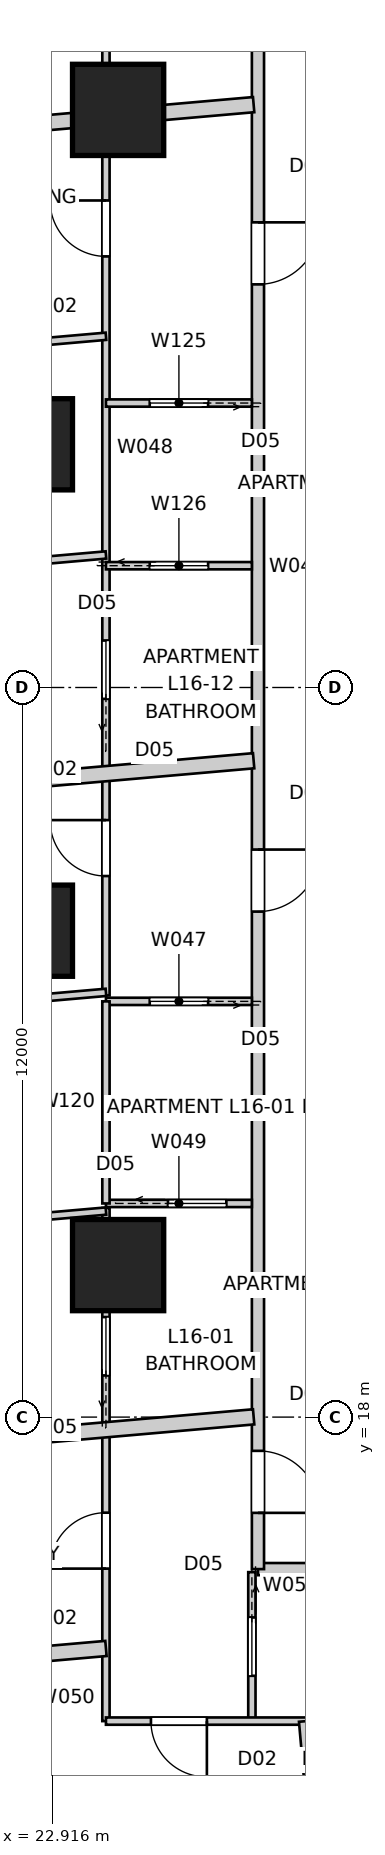
"""IFC4 building model, lengths in metres.
Left out: names, types, materials, properties, quantities, classifications, styles, units other than length and angle.
Written with IfcOpenShell. Run it as: python <this file> out.ifc"""

import sys

from ifc_helpers import new_model, si_unit, direction, frame, frame_2d, origin, origin_2d, place, context, subcontext, project, spatial, rectangle, extrude, element, fill, save


model = new_model("IFC4")
c1 = context("Model", 3, precision=1e-05, world=origin(), true_north=direction((0.0, 1.0)))
c2 = subcontext(c1, "Body", "Model", "MODEL_VIEW")
j1 = project(units=[si_unit("LENGTHUNIT", "METRE"), si_unit("PLANEANGLEUNIT", "RADIAN")], contexts=[c1])
p1 = place(None, origin())
s1 = spatial("IfcSite", under=j1, at=p1, CompositionType="ELEMENT")
p2 = place(p1, origin())
s2 = spatial("IfcBuilding", under=s1, at=p2, CompositionType="ELEMENT")
p3 = place(p2, frame((0.0, 0.0, 60.8)))
s3 = spatial("IfcBuildingStorey", under=s2, at=p3, CompositionType="ELEMENT", Elevation=60.8)
for number, where, z_axis, x_axis in (
    (1, (24.0, 39.5, 0.0), (0.0, 0.0, 1.0), (1.0, 0.0, 0.0)),
    (2, (22.5, 34.0, 0.0), (0.0, 0.0, 1.0), (1.0, 0.0, 0.0)),
    (3, (22.5, 26.0, 0.0), (0.0, 0.0, 1.0), (1.0, 0.0, 0.0)),
    (4, (24.0, 20.5, 0.0), (0.0, 0.0, 1.0), (1.0, 0.0, 0.0)),
):
    element("IfcColumn", number, at=place(p3, frame(where, z_axis=z_axis, x_axis=x_axis)), inside=s3, PredefinedType="COLUMN", context=c2, shape_type="SweptSolid", body=[
        extrude(rectangle(XDim=1.5, YDim=1.5, at=origin_2d()), origin(), (0.0, 0.0, 1.0), 3.4),
    ])
p4 = place(p3, frame((26.3, 15.5, 0.0), z_axis=(0.0, 0.0, 1.0), x_axis=(1.0, 0.0, 0.0)))
e5 = element("IfcWall", 5, at=p4, inside=s3, PredefinedType="PARTITIONING", context=c2, shape_type="SweptSolid", body=[
    extrude(rectangle(XDim=27.4, YDim=0.2, at=frame_2d((13.7, 0.0))), origin(), (0.0, 0.0, 1.0), 3.25),
])
p5 = place(p4, frame((18.776, 0.0, 0.0)))
e6 = element("IfcOpeningElement", 6, at=p5, cuts=e5, PredefinedType="OPENING", context=c2, shape_type="SweptSolid", body=[
    extrude(rectangle(XDim=1.02, YDim=2.34, at=frame_2d((0.51, 1.17))), frame((0.0, 0.11, 0.0), z_axis=(0.0, -1.0, 0.0), x_axis=(1.0, 0.0, 0.0)), (0.0, 0.0, 1.0), 0.22),
])
p6 = place(p4, frame((5.793, 0.0, 0.0)))
e7 = element("IfcOpeningElement", 7, at=p6, cuts=e5, PredefinedType="OPENING", context=c2, shape_type="SweptSolid", body=[
    extrude(rectangle(XDim=1.02, YDim=2.34, at=frame_2d((0.51, 1.17))), frame((0.0, 0.11, 0.0), z_axis=(0.0, -1.0, 0.0), x_axis=(1.0, 0.0, 0.0)), (0.0, 0.0, 1.0), 0.22),
])
p7 = place(p3, frame((26.3, 44.5, 0.0), z_axis=(0.0, 0.0, 1.0), x_axis=(0.0, -1.0, 0.0)))
e8 = element("IfcWall", 8, at=p7, inside=s3, PredefinedType="PARTITIONING", context=c2, shape_type="SweptSolid", body=[
    extrude(rectangle(XDim=29.0, YDim=0.2, at=frame_2d((14.5, 0.0))), origin(), (0.0, 0.0, 1.0), 3.25),
])
p8 = place(p7, frame((6.85, 0.0, 0.0)))
e9 = element("IfcOpeningElement", 9, at=p8, cuts=e8, PredefinedType="OPENING", context=c2, shape_type="SweptSolid", body=[
    extrude(rectangle(XDim=1.02, YDim=2.34, at=frame_2d((0.51, 1.17))), frame((0.0, 0.11, 0.0), z_axis=(0.0, -1.0, 0.0), x_axis=(1.0, 0.0, 0.0)), (0.0, 0.0, 1.0), 0.22),
])
p9 = place(p7, frame((2.345, 0.0, 0.0)))
e10 = element("IfcOpeningElement", 10, at=p9, cuts=e8, PredefinedType="OPENING", context=c2, shape_type="SweptSolid", body=[
    extrude(rectangle(XDim=1.02, YDim=2.1, at=frame_2d((0.51, 1.05))), frame((0.0, 0.11, 0.0), z_axis=(0.0, -1.0, 0.0), x_axis=(1.0, 0.0, 0.0)), (0.0, 0.0, 1.0), 0.22),
])
p10 = place(p7, frame((17.166, 0.0, 0.0)))
e11 = element("IfcOpeningElement", 11, at=p10, cuts=e8, PredefinedType="OPENING", context=c2, shape_type="SweptSolid", body=[
    extrude(rectangle(XDim=1.02, YDim=2.34, at=frame_2d((0.51, 1.17))), frame((0.0, 0.11, 0.0), z_axis=(0.0, -1.0, 0.0), x_axis=(1.0, 0.0, 0.0)), (0.0, 0.0, 1.0), 0.22),
])
p11 = place(p7, frame((27.055, 0.0, 0.0)))
e12 = element("IfcOpeningElement", 12, at=p11, cuts=e8, PredefinedType="OPENING", context=c2, shape_type="SweptSolid", body=[
    extrude(rectangle(XDim=1.02, YDim=2.34, at=frame_2d((0.51, 1.17))), frame((0.0, 0.11, 0.0), z_axis=(0.0, -1.0, 0.0), x_axis=(1.0, 0.0, 0.0)), (0.0, 0.0, 1.0), 0.22),
])
p12 = place(p3, frame((13.66, 38.487, 0.0), z_axis=(0.0, 0.0, 1.0), x_axis=(0.996194851608, 0.087153988028, 0.0)))
e13 = element("IfcWall", 13, at=p12, inside=s3, PredefinedType="PARTITIONING", context=c2, shape_type="SweptSolid", body=[
    extrude(rectangle(XDim=12.617, YDim=0.25, at=frame_2d((6.309, 0.0))), origin(), (0.0, 0.0, 1.0), 3.25),
])
p13 = place(p3, frame((15.534, 17.068, 0.0), z_axis=(0.0, 0.0, 1.0), x_axis=(0.996193939644, 0.08716441141, 0.0)))
e14 = element("IfcWall", 14, at=p13, inside=s3, PredefinedType="PARTITIONING", context=c2, shape_type="SweptSolid", body=[
    extrude(rectangle(XDim=10.736, YDim=0.25, at=frame_2d((5.368, 0.0))), origin(), (0.0, 0.0, 1.0), 3.25),
])
p14 = place(p3, frame((14.597, 27.778, 0.0), z_axis=(0.0, 0.0, 1.0), x_axis=(0.996195419442, 0.087147497287, 0.0)))
e15 = element("IfcWall", 15, at=p14, inside=s3, PredefinedType="PARTITIONING", context=c2, shape_type="SweptSolid", body=[
    extrude(rectangle(XDim=11.677, YDim=0.25, at=frame_2d((5.838, 0.0))), origin(), (0.0, 0.0, 1.0), 3.25),
])
p15 = place(p3, frame((26.2, 24.838, 0.0), z_axis=(0.0, 0.0, 1.0), x_axis=(-1.0, 0.0, 0.0)))
e16 = element("IfcWall", 16, at=p15, inside=s3, PredefinedType="PARTITIONING", context=c2, shape_type="SweptSolid", body=[
    extrude(rectangle(XDim=2.4, YDim=0.12, at=frame_2d((1.2, 0.0))), origin(), (0.0, 0.0, 1.0), 3.25),
])
p16 = place(p15, frame((0.72, 0.0, 0.0)))
e17 = element("IfcOpeningElement", 17, at=p16, cuts=e16, PredefinedType="OPENING", context=c2, shape_type="SweptSolid", body=[
    extrude(rectangle(XDim=0.96, YDim=2.1, at=frame_2d((0.48, 1.05))), frame((0.0, 0.07, 0.0), z_axis=(0.0, -1.0, 0.0), x_axis=(1.0, 0.0, 0.0)), (0.0, 0.0, 1.0), 0.14),
])
p17 = place(p3, frame((23.8, 24.936, 0.0), z_axis=(0.0, 0.0, 1.0), x_axis=(0.0, 1.0, 0.0)))
e18 = element("IfcWall", 18, at=p17, inside=s3, PredefinedType="PARTITIONING", context=c2, shape_type="SweptSolid", body=[
    extrude(rectangle(XDim=22.064, YDim=0.12, at=frame_2d((11.032, 0.0))), origin(), (0.0, 0.0, 1.0), 2.55),
])
p18 = place(p17, frame((12.155, 0.0, 0.0)))
e19 = element("IfcOpeningElement", 19, at=p18, cuts=e18, PredefinedType="OPENING", context=c2, shape_type="SweptSolid", body=[
    extrude(rectangle(XDim=0.92, YDim=2.34, at=frame_2d((0.46, 1.17))), frame((0.0, 0.07, 0.0), z_axis=(0.0, -1.0, 0.0), x_axis=(1.0, 0.0, 0.0)), (0.0, 0.0, 1.0), 0.14),
])
p19 = place(p17, frame((16.136, 0.0, 0.0)))
e20 = element("IfcOpeningElement", 20, at=p19, cuts=e18, PredefinedType="OPENING", context=c2, shape_type="SweptSolid", body=[
    extrude(rectangle(XDim=0.92, YDim=2.34, at=frame_2d((0.46, 1.17))), frame((0.0, 0.07, 0.0), z_axis=(0.0, -1.0, 0.0), x_axis=(1.0, 0.0, 0.0)), (0.0, 0.0, 1.0), 0.14),
])
p20 = place(p17, frame((1.964, 0.0, 0.0)))
e21 = element("IfcOpeningElement", 21, at=p20, cuts=e18, PredefinedType="OPENING", context=c2, shape_type="SweptSolid", body=[
    extrude(rectangle(XDim=0.92, YDim=2.34, at=frame_2d((0.46, 1.17))), frame((0.0, 0.07, 0.0), z_axis=(0.0, -1.0, 0.0), x_axis=(1.0, 0.0, 0.0)), (0.0, 0.0, 1.0), 0.14),
])
p21 = place(p17, frame((4.877, 0.0, 0.0)))
e22 = element("IfcOpeningElement", 22, at=p21, cuts=e18, PredefinedType="OPENING", context=c2, shape_type="SweptSolid", body=[
    extrude(rectangle(XDim=0.96, YDim=2.1, at=frame_2d((0.48, 1.05))), frame((0.0, 0.07, 0.0), z_axis=(0.0, -1.0, 0.0), x_axis=(1.0, 0.0, 0.0)), (0.0, 0.0, 1.0), 0.14),
])
p22 = place(p3, frame((23.8, 21.514, 0.0), z_axis=(0.0, 0.0, 1.0), x_axis=(1.0, 0.0, 0.0)))
e23 = element("IfcWall", 23, at=p22, inside=s3, PredefinedType="PARTITIONING", context=c2, shape_type="SweptSolid", body=[
    extrude(rectangle(XDim=2.4, YDim=0.12, at=frame_2d((1.2, 0.0))), origin(), (0.0, 0.0, 1.0), 3.25),
])
p23 = place(p22, frame((1.02, 0.0, 0.0)))
e24 = element("IfcOpeningElement", 24, at=p23, cuts=e23, PredefinedType="OPENING", context=c2, shape_type="SweptSolid", body=[
    extrude(rectangle(XDim=0.96, YDim=2.1, at=frame_2d((0.48, 1.05))), frame((0.0, 0.07, 0.0), z_axis=(0.0, -1.0, 0.0), x_axis=(1.0, 0.0, 0.0)), (0.0, 0.0, 1.0), 0.14),
])
p24 = place(p3, frame((23.8, 13.0, 0.0), z_axis=(0.0, 0.0, 1.0), x_axis=(0.0, 1.0, 0.0)))
e25 = element("IfcWall", 25, at=p24, inside=s3, PredefinedType="PARTITIONING", context=c2, shape_type="SweptSolid", body=[
    extrude(rectangle(XDim=8.439, YDim=0.12, at=frame_2d((4.219, 0.0))), origin(), (0.0, 0.0, 1.0), 2.55),
])
p25 = place(p24, frame((2.508, 0.0, 0.0)))
e26 = element("IfcOpeningElement", 26, at=p25, cuts=e25, PredefinedType="OPENING", context=c2, shape_type="SweptSolid", body=[
    extrude(rectangle(XDim=0.92, YDim=2.34, at=frame_2d((0.46, 1.17))), frame((0.0, 0.07, 0.0), z_axis=(0.0, -1.0, 0.0), x_axis=(1.0, 0.0, 0.0)), (0.0, 0.0, 1.0), 0.14),
])
p26 = place(p24, frame((5.685, 0.0, 0.0)))
e27 = element("IfcOpeningElement", 27, at=p26, cuts=e25, PredefinedType="OPENING", context=c2, shape_type="SweptSolid", body=[
    extrude(rectangle(XDim=0.96, YDim=2.1, at=frame_2d((0.48, 1.05))), frame((0.0, 0.07, 0.0), z_axis=(0.0, -1.0, 0.0), x_axis=(1.0, 0.0, 0.0)), (0.0, 0.0, 1.0), 0.14),
])
p27 = place(p3, frame((23.8, 21.514, 0.0), z_axis=(0.0, 0.0, 1.0), x_axis=(0.0, 1.0, 0.0)))
e28 = element("IfcWall", 28, at=p27, inside=s3, PredefinedType="PARTITIONING", context=c2, shape_type="SweptSolid", body=[
    extrude(rectangle(XDim=3.324, YDim=0.12, at=frame_2d((1.662, 0.0))), origin(), (0.0, 0.0, 1.0), 3.25),
])
p28 = place(p3, frame((23.8, 24.986, 0.0), z_axis=(0.0, 0.0, 1.0), x_axis=(-0.996194045583, -0.087163200634, 0.0)))
e29 = element("IfcWall", 29, at=p28, inside=s3, PredefinedType="PARTITIONING", context=c2, shape_type="SweptSolid", body=[
    extrude(rectangle(XDim=8.885, YDim=0.12, at=frame_2d((4.442, 0.0))), origin(), (0.0, 0.0, 1.0), 3.25),
])
p29 = place(p28, frame((4.002, 0.0, 0.0)))
e30 = element("IfcOpeningElement", 30, at=p29, cuts=e29, PredefinedType="OPENING", context=c2, shape_type="SweptSolid", body=[
    extrude(rectangle(XDim=0.92, YDim=2.34, at=frame_2d((0.46, 1.17))), frame((0.0, 0.07, 0.0), z_axis=(0.0, -1.0, 0.0), x_axis=(1.0, 0.0, 0.0)), (0.0, 0.0, 1.0), 0.14),
])
p30 = place(p3, frame((23.8, 21.389, 0.0), z_axis=(0.0, 0.0, 1.0), x_axis=(-0.996194273991, -0.087160590107, 0.0)))
e31 = element("IfcWall", 31, at=p30, inside=s3, PredefinedType="PARTITIONING", context=c2, shape_type="SweptSolid", body=[
    extrude(rectangle(XDim=8.571, YDim=0.12, at=frame_2d((4.286, 0.0))), origin(), (0.0, 0.0, 1.0), 3.25),
])
p31 = place(p3, frame((26.2, 15.45, 0.0), z_axis=(0.0, 0.0, 1.0), x_axis=(0.0, -1.0, 0.0)))
e32 = element("IfcWall", 32, at=p31, inside=s3, PredefinedType="PARTITIONING", context=c2, shape_type="SweptSolid", body=[
    extrude(rectangle(XDim=2.45, YDim=0.12, at=frame_2d((1.225, 0.0))), origin(), (0.0, 0.0, 1.0), 3.25),
])
p32 = place(p31, frame((0.745, 0.0, 0.0)))
e33 = element("IfcOpeningElement", 33, at=p32, cuts=e32, PredefinedType="OPENING", context=c2, shape_type="SweptSolid", body=[
    extrude(rectangle(XDim=0.96, YDim=2.1, at=frame_2d((0.48, 1.05))), frame((0.0, 0.07, 0.0), z_axis=(0.0, -1.0, 0.0), x_axis=(1.0, 0.0, 0.0)), (0.0, 0.0, 1.0), 0.14),
])
p33 = place(p3, frame((30.333, 13.0, 0.0), z_axis=(0.0, 0.0, 1.0), x_axis=(-1.0, 0.0, 0.0)))
e34 = element("IfcWall", 34, at=p33, inside=s3, PredefinedType="PARTITIONING", context=c2, shape_type="SweptSolid", body=[
    extrude(rectangle(XDim=6.533, YDim=0.12, at=frame_2d((3.267, 0.0))), origin(), (0.0, 0.0, 1.0), 3.25),
])
p34 = place(p33, frame((4.873, 0.0, 0.0)))
e35 = element("IfcOpeningElement", 35, at=p34, cuts=e34, PredefinedType="OPENING", context=c2, shape_type="SweptSolid", body=[
    extrude(rectangle(XDim=0.92, YDim=2.34, at=frame_2d((0.46, 1.17))), frame((0.0, 0.07, 0.0), z_axis=(0.0, -1.0, 0.0), x_axis=(1.0, 0.0, 0.0)), (0.0, 0.0, 1.0), 0.14),
])
p35 = place(p33, frame((1.162, 0.0, 0.0)))
e36 = element("IfcOpeningElement", 36, at=p35, cuts=e34, PredefinedType="OPENING", context=c2, shape_type="SweptSolid", body=[
    extrude(rectangle(XDim=0.96, YDim=2.1, at=frame_2d((0.48, 1.05))), frame((0.0, 0.07, 0.0), z_axis=(0.0, -1.0, 0.0), x_axis=(1.0, 0.0, 0.0)), (0.0, 0.0, 1.0), 0.14),
])
p36 = place(p3, frame((16.843, 13.586, 0.0), z_axis=(0.0, 0.0, 1.0), x_axis=(0.996195462691, 0.087147002895, 0.0)))
e37 = element("IfcWall", 37, at=p36, inside=s3, PredefinedType="PARTITIONING", context=c2, shape_type="SweptSolid", body=[
    extrude(rectangle(XDim=6.984, YDim=0.25, at=frame_2d((3.492, 0.0))), origin(), (0.0, 0.0, 1.0), 2.638),
])
p37 = place(p36, frame((1.548, 0.0, 0.0)))
e38 = element("IfcOpeningElement", 38, at=p37, cuts=e37, PredefinedType="OPENING", context=c2, shape_type="SweptSolid", body=[
    extrude(rectangle(XDim=0.92, YDim=2.34, at=frame_2d((0.46, 1.17))), frame((0.0, 0.135, 0.0), z_axis=(0.0, -1.0, 0.0), x_axis=(1.0, 0.0, 0.0)), (0.0, 0.0, 1.0), 0.27),
])
p38 = place(p3, frame((27.099, 13.0, 0.0), z_axis=(0.0, 0.0, 1.0), x_axis=(0.087158236544, -0.99619447991, 0.0)))
e39 = element("IfcWall", 39, at=p38, inside=s3, PredefinedType="PARTITIONING", context=c2, shape_type="SweptSolid", body=[
    extrude(rectangle(XDim=8.689, YDim=0.25, at=frame_2d((4.344, 0.0))), origin(), (0.0, 0.0, 1.0), 2.638),
])
p39 = place(p3, frame((26.2, 34.678, 0.0), z_axis=(0.0, 0.0, 1.0), x_axis=(-1.0, 0.0, 0.0)))
e40 = element("IfcWall", 40, at=p39, inside=s3, PredefinedType="PARTITIONING", context=c2, shape_type="SweptSolid", body=[
    extrude(rectangle(XDim=2.4, YDim=0.12, at=frame_2d((1.2, 0.0))), origin(), (0.0, 0.0, 1.0), 3.25),
])
p40 = place(p39, frame((0.72, 0.0, 0.0)))
e41 = element("IfcOpeningElement", 41, at=p40, cuts=e40, PredefinedType="OPENING", context=c2, shape_type="SweptSolid", body=[
    extrude(rectangle(XDim=0.96, YDim=2.1, at=frame_2d((0.48, 1.05))), frame((0.0, 0.07, 0.0), z_axis=(0.0, -1.0, 0.0), x_axis=(1.0, 0.0, 0.0)), (0.0, 0.0, 1.0), 0.14),
])
p41 = place(p3, frame((23.8, 32.003, 0.0), z_axis=(0.0, 0.0, 1.0), x_axis=(1.0, 0.0, 0.0)))
e42 = element("IfcWall", 42, at=p41, inside=s3, PredefinedType="PARTITIONING", context=c2, shape_type="SweptSolid", body=[
    extrude(rectangle(XDim=2.4, YDim=0.12, at=frame_2d((1.2, 0.0))), origin(), (0.0, 0.0, 1.0), 3.25),
])
p42 = place(p41, frame((0.72, 0.0, 0.0)))
e43 = element("IfcOpeningElement", 43, at=p42, cuts=e42, PredefinedType="OPENING", context=c2, shape_type="SweptSolid", body=[
    extrude(rectangle(XDim=0.96, YDim=2.1, at=frame_2d((0.48, 1.05))), frame((0.0, 0.07, 0.0), z_axis=(0.0, -1.0, 0.0), x_axis=(1.0, 0.0, 0.0)), (0.0, 0.0, 1.0), 0.14),
])
p43 = place(p3, frame((23.8, 35.777, 0.0), z_axis=(0.0, 0.0, 1.0), x_axis=(-0.996195794011, -0.087143215425, 0.0)))
e44 = element("IfcWall", 44, at=p43, inside=s3, PredefinedType="PARTITIONING", context=c2, shape_type="SweptSolid", body=[
    extrude(rectangle(XDim=9.825, YDim=0.12, at=frame_2d((4.913, 0.0))), origin(), (0.0, 0.0, 1.0), 2.796),
])
p44 = place(p43, frame((4.473, 0.0, 0.0)))
e45 = element("IfcOpeningElement", 45, at=p44, cuts=e44, PredefinedType="OPENING", context=c2, shape_type="SweptSolid", body=[
    extrude(rectangle(XDim=0.92, YDim=2.34, at=frame_2d((0.46, 1.17))), frame((0.0, 0.07, 0.0), z_axis=(0.0, -1.0, 0.0), x_axis=(1.0, 0.0, 0.0)), (0.0, 0.0, 1.0), 0.14),
])
p45 = place(p3, frame((23.8, 32.18, 0.0), z_axis=(0.0, 0.0, 1.0), x_axis=(-0.996193828936, -0.087165676674, 0.0)))
e46 = element("IfcWall", 46, at=p45, inside=s3, PredefinedType="PARTITIONING", context=c2, shape_type="SweptSolid", body=[
    extrude(rectangle(XDim=9.512, YDim=0.12, at=frame_2d((4.756, 0.0))), origin(), (0.0, 0.0, 1.0), 3.25),
])
p46 = place(p8, origin())
e47 = element("IfcDoor", 47, at=p46, inside=s3, OperationType="SINGLE_SWING_LEFT", PredefinedType="DOOR", context=c2, shape_type="SweptSolid", body=[
    extrude(rectangle(XDim=1.02, YDim=2.34, at=frame_2d((0.51, 1.17))), frame((0.0, 0.025, 0.0), z_axis=(0.0, -1.0, 0.0), x_axis=(1.0, 0.0, 0.0)), (0.0, 0.0, 1.0), 0.05),
])
fill(e9, e47)
p47 = place(p10, origin())
e48 = element("IfcDoor", 48, at=p47, inside=s3, OperationType="SINGLE_SWING_LEFT", PredefinedType="DOOR", context=c2, shape_type="SweptSolid", body=[
    extrude(rectangle(XDim=1.02, YDim=2.34, at=frame_2d((0.51, 1.17))), frame((0.0, 0.025, 0.0), z_axis=(0.0, -1.0, 0.0), x_axis=(1.0, 0.0, 0.0)), (0.0, 0.0, 1.0), 0.05),
])
fill(e11, e48)
p48 = place(p11, origin())
e49 = element("IfcDoor", 49, at=p48, inside=s3, OperationType="SINGLE_SWING_RIGHT", PredefinedType="DOOR", context=c2, shape_type="SweptSolid", body=[
    extrude(rectangle(XDim=1.02, YDim=2.34, at=frame_2d((0.51, 1.17))), frame((0.0, 0.025, 0.0), z_axis=(0.0, -1.0, 0.0), x_axis=(1.0, 0.0, 0.0)), (0.0, 0.0, 1.0), 0.05),
])
fill(e12, e49)
p49 = place(p18, origin())
e50 = element("IfcDoor", 50, at=p49, inside=s3, OperationType="SINGLE_SWING_RIGHT", PredefinedType="DOOR", context=c2, shape_type="SweptSolid", body=[
    extrude(rectangle(XDim=0.92, YDim=2.34, at=frame_2d((0.46, 1.17))), frame((0.0, 0.025, 0.0), z_axis=(0.0, -1.0, 0.0), x_axis=(1.0, 0.0, 0.0)), (0.0, 0.0, 1.0), 0.05),
])
fill(e19, e50)
p50 = place(p40, origin())
e51 = element("IfcDoor", 51, at=p50, inside=s3, OperationType="SLIDING_TO_LEFT", PredefinedType="DOOR", context=c2, shape_type="SweptSolid", body=[
    extrude(rectangle(XDim=0.96, YDim=2.1, at=frame_2d((0.48, 1.05))), frame((0.0, 0.025, 0.0), z_axis=(0.0, -1.0, 0.0), x_axis=(1.0, 0.0, 0.0)), (0.0, 0.0, 1.0), 0.05),
])
fill(e41, e51)
p51 = place(p20, origin())
e52 = element("IfcDoor", 52, at=p51, inside=s3, OperationType="SINGLE_SWING_RIGHT", PredefinedType="DOOR", context=c2, shape_type="SweptSolid", body=[
    extrude(rectangle(XDim=0.92, YDim=2.34, at=frame_2d((0.46, 1.17))), frame((0.0, 0.025, 0.0), z_axis=(0.0, -1.0, 0.0), x_axis=(1.0, 0.0, 0.0)), (0.0, 0.0, 1.0), 0.05),
])
fill(e21, e52)
p52 = place(p16, origin())
e53 = element("IfcDoor", 53, at=p52, inside=s3, OperationType="SLIDING_TO_LEFT", PredefinedType="DOOR", context=c2, shape_type="SweptSolid", body=[
    extrude(rectangle(XDim=0.96, YDim=2.1, at=frame_2d((0.48, 1.05))), frame((0.0, 0.025, 0.0), z_axis=(0.0, -1.0, 0.0), x_axis=(1.0, 0.0, 0.0)), (0.0, 0.0, 1.0), 0.05),
])
fill(e17, e53)
p53 = place(p25, origin())
e54 = element("IfcDoor", 54, at=p53, inside=s3, OperationType="SINGLE_SWING_LEFT", PredefinedType="DOOR", context=c2, shape_type="SweptSolid", body=[
    extrude(rectangle(XDim=0.92, YDim=2.34, at=frame_2d((0.46, 1.17))), frame((0.0, 0.025, 0.0), z_axis=(0.0, -1.0, 0.0), x_axis=(1.0, 0.0, 0.0)), (0.0, 0.0, 1.0), 0.05),
])
fill(e26, e54)
p54 = place(p32, origin())
e55 = element("IfcDoor", 55, at=p54, inside=s3, OperationType="SLIDING_TO_LEFT", PredefinedType="DOOR", context=c2, shape_type="SweptSolid", body=[
    extrude(rectangle(XDim=0.96, YDim=2.1, at=frame_2d((0.48, 1.05))), frame((0.0, 0.025, 0.0), z_axis=(0.0, -1.0, 0.0), x_axis=(1.0, 0.0, 0.0)), (0.0, 0.0, 1.0), 0.05),
])
fill(e33, e55)
p55 = place(p34, origin())
e56 = element("IfcDoor", 56, at=p55, inside=s3, OperationType="SINGLE_SWING_LEFT", PredefinedType="DOOR", context=c2, shape_type="SweptSolid", body=[
    extrude(rectangle(XDim=0.92, YDim=2.34, at=frame_2d((0.46, 1.17))), frame((0.0, 0.025, 0.0), z_axis=(0.0, -1.0, 0.0), x_axis=(1.0, 0.0, 0.0)), (0.0, 0.0, 1.0), 0.05),
])
fill(e35, e56)
p56 = place(p42, origin())
e57 = element("IfcDoor", 57, at=p56, inside=s3, OperationType="SLIDING_TO_LEFT", PredefinedType="DOOR", context=c2, shape_type="SweptSolid", body=[
    extrude(rectangle(XDim=0.96, YDim=2.1, at=frame_2d((0.48, 1.05))), frame((0.0, 0.025, 0.0), z_axis=(0.0, -1.0, 0.0), x_axis=(1.0, 0.0, 0.0)), (0.0, 0.0, 1.0), 0.05),
])
fill(e43, e57)
p57 = place(p23, origin())
e58 = element("IfcDoor", 58, at=p57, inside=s3, OperationType="SLIDING_TO_LEFT", PredefinedType="DOOR", context=c2, shape_type="SweptSolid", body=[
    extrude(rectangle(XDim=0.96, YDim=2.1, at=frame_2d((0.48, 1.05))), frame((0.0, 0.025, 0.0), z_axis=(0.0, -1.0, 0.0), x_axis=(1.0, 0.0, 0.0)), (0.0, 0.0, 1.0), 0.05),
])
fill(e24, e58)
p58 = place(p21, origin())
e59 = element("IfcDoor", 59, at=p58, inside=s3, OperationType="SLIDING_TO_LEFT", PredefinedType="DOOR", context=c2, shape_type="SweptSolid", body=[
    extrude(rectangle(XDim=0.96, YDim=2.1, at=frame_2d((0.48, 1.05))), frame((0.0, 0.025, 0.0), z_axis=(0.0, -1.0, 0.0), x_axis=(1.0, 0.0, 0.0)), (0.0, 0.0, 1.0), 0.05),
])
fill(e22, e59)
p59 = place(p26, origin())
e60 = element("IfcDoor", 60, at=p59, inside=s3, OperationType="SLIDING_TO_LEFT", PredefinedType="DOOR", context=c2, shape_type="SweptSolid", body=[
    extrude(rectangle(XDim=0.96, YDim=2.1, at=frame_2d((0.48, 1.05))), frame((0.0, 0.025, 0.0), z_axis=(0.0, -1.0, 0.0), x_axis=(1.0, 0.0, 0.0)), (0.0, 0.0, 1.0), 0.05),
])
fill(e27, e60)
save(model, sys.argv[1])
